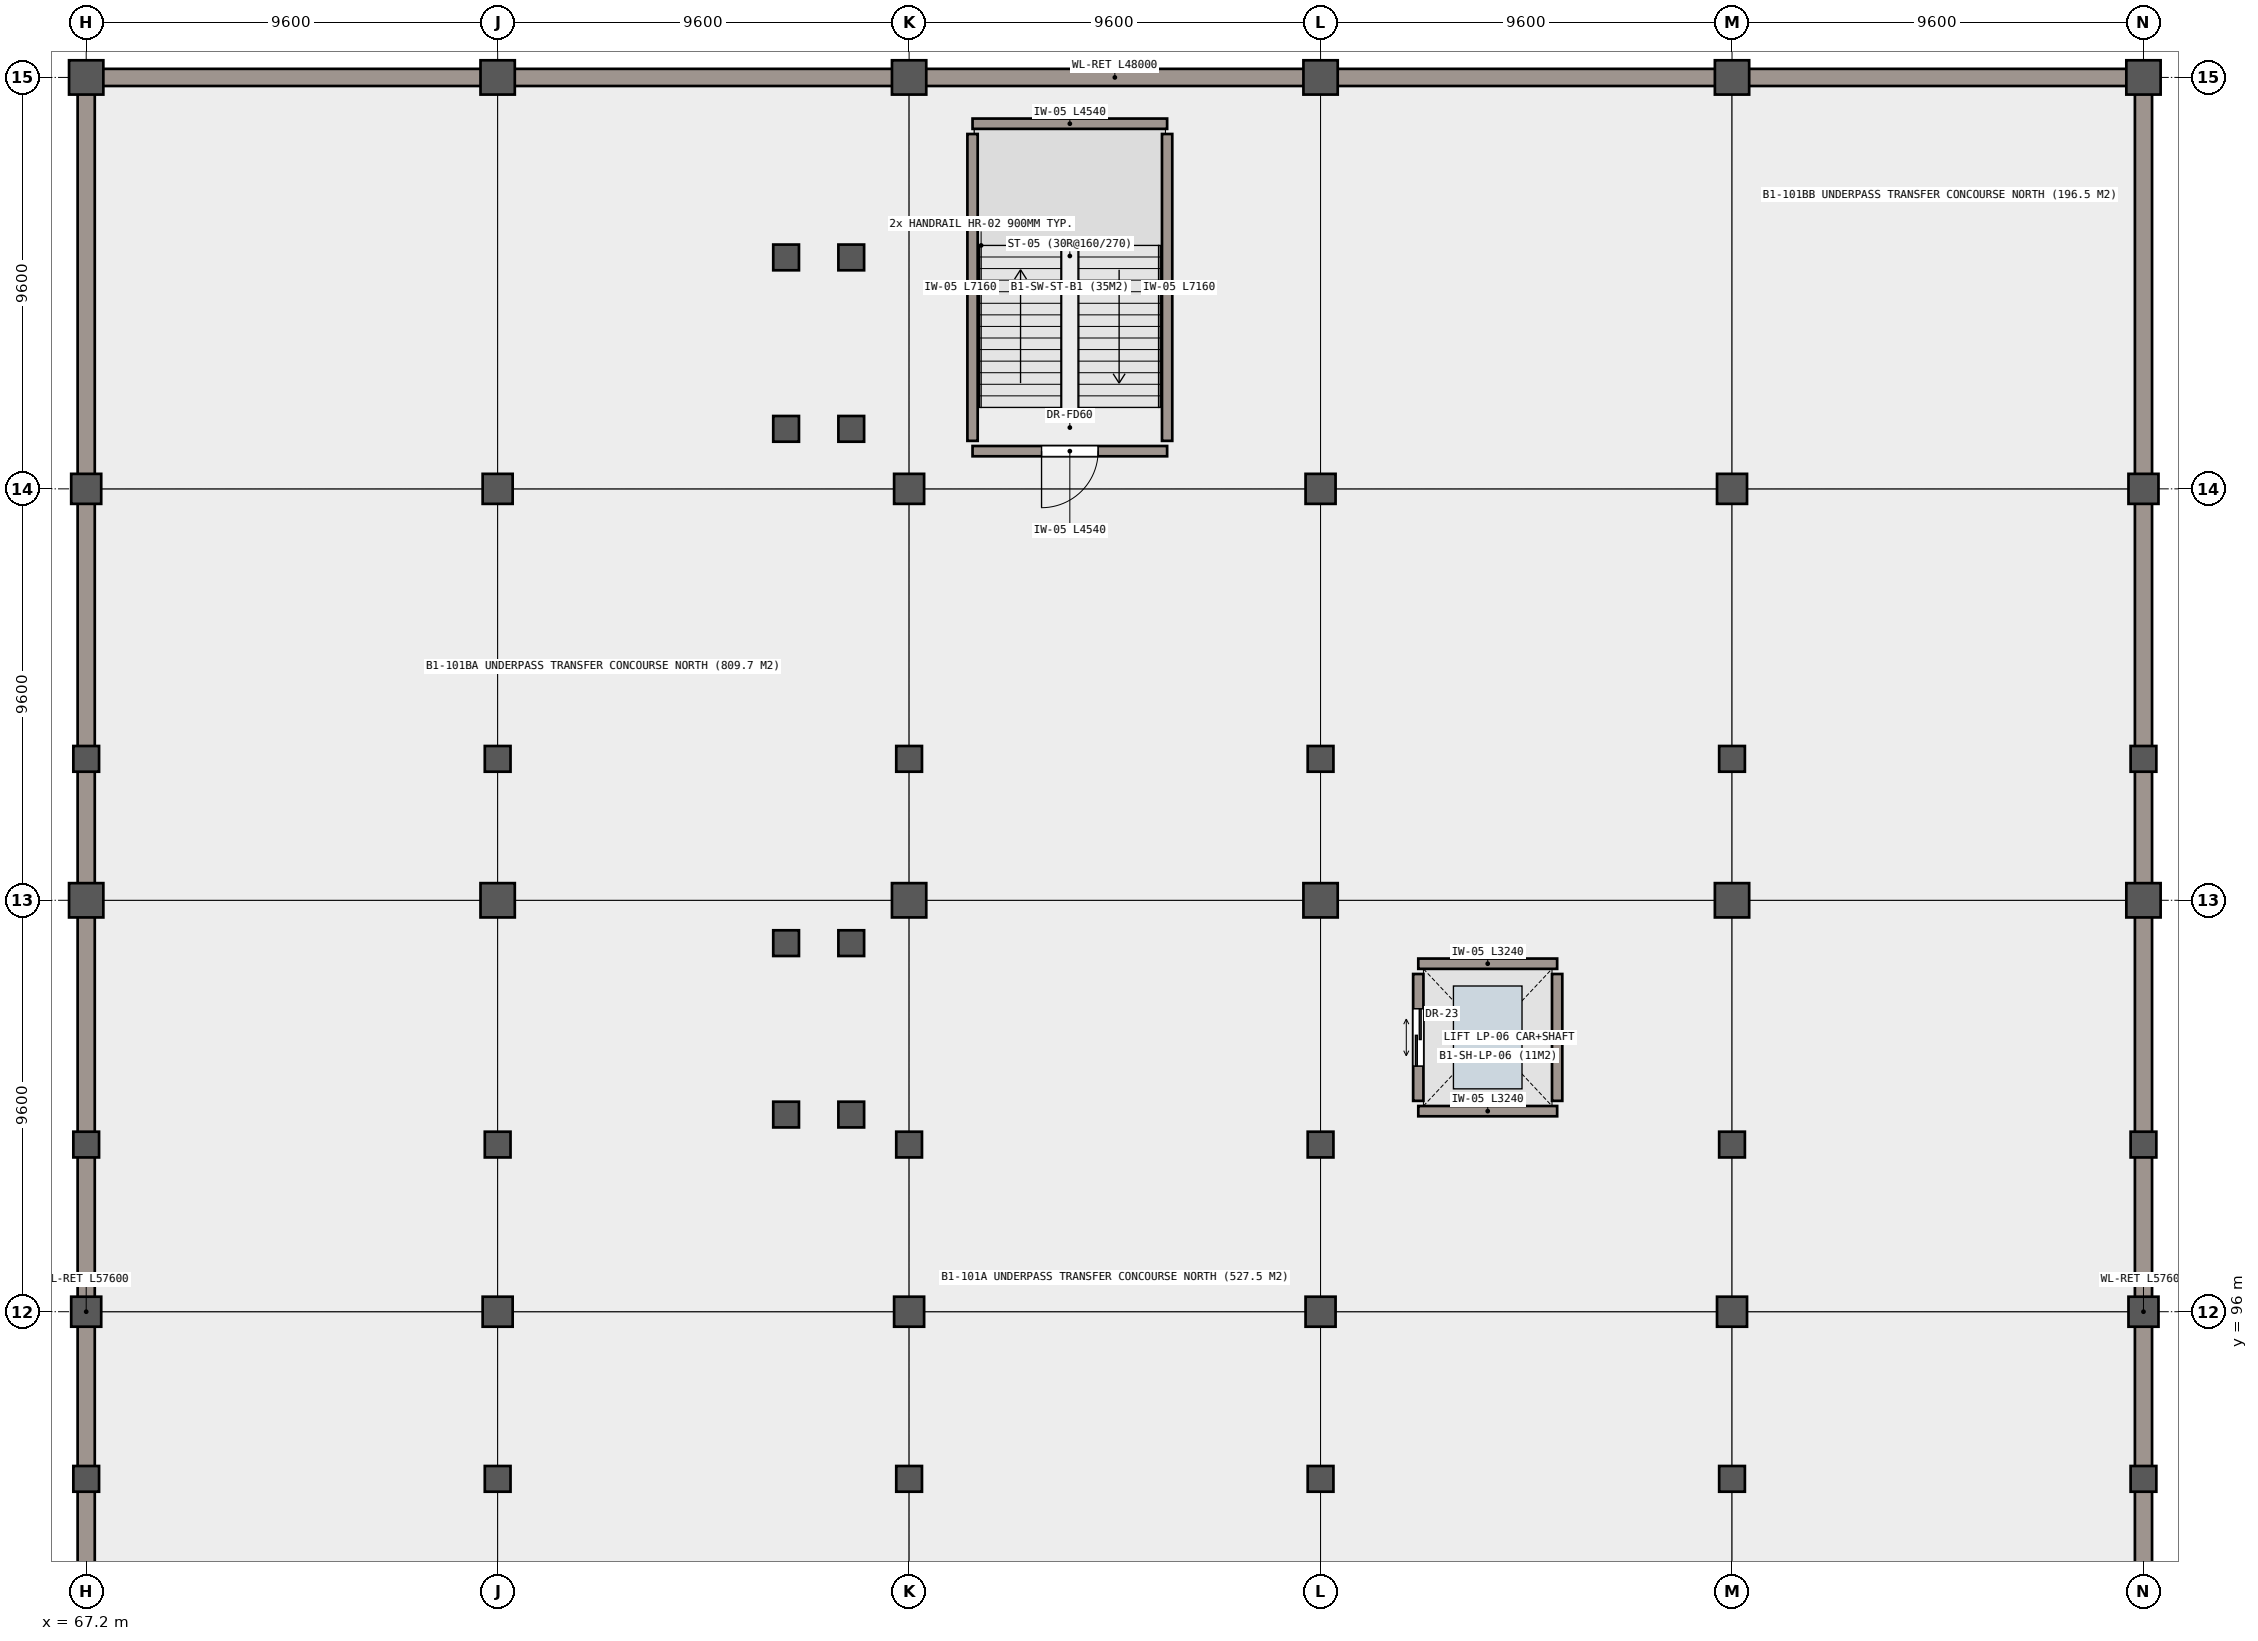
"""IFC4 building model, lengths in metres.
Left out: names, types, materials, properties, quantities, classifications, styles, units other than length and angle.
Written with IfcOpenShell. Run it as: python <this file> out.ifc"""

import sys

from ifc_helpers import new_model, si_unit, direction, frame, frame_2d, origin, origin_2d, place, context, subcontext, project, spatial, rectangle, extrude, element, fill, save


model = new_model("IFC4")
c1 = context("Model", 3, precision=1e-05, world=origin(), true_north=direction((0.0, 1.0)))
c2 = subcontext(c1, "Body", "Model", "MODEL_VIEW")
j1 = project(units=[si_unit("LENGTHUNIT", "METRE"), si_unit("PLANEANGLEUNIT", "RADIAN")], contexts=[c1])
p1 = place(None, origin())
s1 = spatial("IfcSite", under=j1, at=p1, CompositionType="ELEMENT")
p2 = place(p1, origin())
s2 = spatial("IfcBuilding", under=s1, at=p2, CompositionType="ELEMENT")
p3 = place(p2, frame((0.0, 0.0, -4.8)))
s3 = spatial("IfcBuildingStorey", under=s2, at=p3, CompositionType="ELEMENT", Elevation=-4.8)
p4 = place(p3, frame((67.2, 96.0, 0.0), z_axis=(0.0, 0.0, 1.0), x_axis=(1.0, 0.0, 0.0)))
e1 = element("IfcColumn", 1, at=p4, inside=s3, PredefinedType="COLUMN", context=c2, shape_type="SweptSolid", body=[
    extrude(rectangle(XDim=0.7, YDim=0.7, at=origin_2d()), origin(), (0.0, 0.0, 1.0), 4.8),
])
p5 = place(p3, frame((67.2, 105.6, 0.0), z_axis=(0.0, 0.0, 1.0), x_axis=(1.0, 0.0, 0.0)))
e2 = element("IfcColumn", 2, at=p5, inside=s3, PredefinedType="COLUMN", context=c2, shape_type="SweptSolid", body=[
    extrude(rectangle(XDim=0.8, YDim=0.8, at=origin_2d()), origin(), (0.0, 0.0, 1.0), 4.8),
])
p6 = place(p3, frame((67.2, 115.2, 0.0), z_axis=(0.0, 0.0, 1.0), x_axis=(1.0, 0.0, 0.0)))
e3 = element("IfcColumn", 3, at=p6, inside=s3, PredefinedType="COLUMN", context=c2, shape_type="SweptSolid", body=[
    extrude(rectangle(XDim=0.7, YDim=0.7, at=origin_2d()), origin(), (0.0, 0.0, 1.0), 4.8),
])
p7 = place(p3, frame((67.2, 124.8, 0.0), z_axis=(0.0, 0.0, 1.0), x_axis=(1.0, 0.0, 0.0)))
e4 = element("IfcColumn", 4, at=p7, inside=s3, PredefinedType="COLUMN", context=c2, shape_type="SweptSolid", body=[
    extrude(rectangle(XDim=0.8, YDim=0.8, at=origin_2d()), origin(), (0.0, 0.0, 1.0), 4.8),
])
p8 = place(p3, frame((76.8, 96.0, 0.0), z_axis=(0.0, 0.0, 1.0), x_axis=(1.0, 0.0, 0.0)))
e5 = element("IfcColumn", 5, at=p8, inside=s3, PredefinedType="COLUMN", context=c2, shape_type="SweptSolid", body=[
    extrude(rectangle(XDim=0.7, YDim=0.7, at=origin_2d()), origin(), (0.0, 0.0, 1.0), 4.8),
])
p9 = place(p3, frame((76.8, 105.6, 0.0), z_axis=(0.0, 0.0, 1.0), x_axis=(1.0, 0.0, 0.0)))
e6 = element("IfcColumn", 6, at=p9, inside=s3, PredefinedType="COLUMN", context=c2, shape_type="SweptSolid", body=[
    extrude(rectangle(XDim=0.8, YDim=0.8, at=origin_2d()), origin(), (0.0, 0.0, 1.0), 4.8),
])
p10 = place(p3, frame((76.8, 115.2, 0.0), z_axis=(0.0, 0.0, 1.0), x_axis=(1.0, 0.0, 0.0)))
e7 = element("IfcColumn", 7, at=p10, inside=s3, PredefinedType="COLUMN", context=c2, shape_type="SweptSolid", body=[
    extrude(rectangle(XDim=0.7, YDim=0.7, at=origin_2d()), origin(), (0.0, 0.0, 1.0), 4.8),
])
p11 = place(p3, frame((76.8, 124.8, 0.0), z_axis=(0.0, 0.0, 1.0), x_axis=(1.0, 0.0, 0.0)))
e8 = element("IfcColumn", 8, at=p11, inside=s3, PredefinedType="COLUMN", context=c2, shape_type="SweptSolid", body=[
    extrude(rectangle(XDim=0.8, YDim=0.8, at=origin_2d()), origin(), (0.0, 0.0, 1.0), 4.8),
])
p12 = place(p3, frame((86.4, 96.0, 0.0), z_axis=(0.0, 0.0, 1.0), x_axis=(1.0, 0.0, 0.0)))
e9 = element("IfcColumn", 9, at=p12, inside=s3, PredefinedType="COLUMN", context=c2, shape_type="SweptSolid", body=[
    extrude(rectangle(XDim=0.7, YDim=0.7, at=origin_2d()), origin(), (0.0, 0.0, 1.0), 4.8),
])
p13 = place(p3, frame((86.4, 105.6, 0.0), z_axis=(0.0, 0.0, 1.0), x_axis=(1.0, 0.0, 0.0)))
e10 = element("IfcColumn", 10, at=p13, inside=s3, PredefinedType="COLUMN", context=c2, shape_type="SweptSolid", body=[
    extrude(rectangle(XDim=0.8, YDim=0.8, at=origin_2d()), origin(), (0.0, 0.0, 1.0), 4.8),
])
p14 = place(p3, frame((86.4, 115.2, 0.0), z_axis=(0.0, 0.0, 1.0), x_axis=(1.0, 0.0, 0.0)))
e11 = element("IfcColumn", 11, at=p14, inside=s3, PredefinedType="COLUMN", context=c2, shape_type="SweptSolid", body=[
    extrude(rectangle(XDim=0.7, YDim=0.7, at=origin_2d()), origin(), (0.0, 0.0, 1.0), 4.8),
])
p15 = place(p3, frame((86.4, 124.8, 0.0), z_axis=(0.0, 0.0, 1.0), x_axis=(1.0, 0.0, 0.0)))
e12 = element("IfcColumn", 12, at=p15, inside=s3, PredefinedType="COLUMN", context=c2, shape_type="SweptSolid", body=[
    extrude(rectangle(XDim=0.8, YDim=0.8, at=origin_2d()), origin(), (0.0, 0.0, 1.0), 4.8),
])
p16 = place(p3, frame((96.0, 96.0, 0.0), z_axis=(0.0, 0.0, 1.0), x_axis=(1.0, 0.0, 0.0)))
e13 = element("IfcColumn", 13, at=p16, inside=s3, PredefinedType="COLUMN", context=c2, shape_type="SweptSolid", body=[
    extrude(rectangle(XDim=0.7, YDim=0.7, at=origin_2d()), origin(), (0.0, 0.0, 1.0), 4.8),
])
p17 = place(p3, frame((96.0, 105.6, 0.0), z_axis=(0.0, 0.0, 1.0), x_axis=(1.0, 0.0, 0.0)))
e14 = element("IfcColumn", 14, at=p17, inside=s3, PredefinedType="COLUMN", context=c2, shape_type="SweptSolid", body=[
    extrude(rectangle(XDim=0.8, YDim=0.8, at=origin_2d()), origin(), (0.0, 0.0, 1.0), 4.8),
])
p18 = place(p3, frame((96.0, 115.2, 0.0), z_axis=(0.0, 0.0, 1.0), x_axis=(1.0, 0.0, 0.0)))
e15 = element("IfcColumn", 15, at=p18, inside=s3, PredefinedType="COLUMN", context=c2, shape_type="SweptSolid", body=[
    extrude(rectangle(XDim=0.7, YDim=0.7, at=origin_2d()), origin(), (0.0, 0.0, 1.0), 4.8),
])
p19 = place(p3, frame((96.0, 124.8, 0.0), z_axis=(0.0, 0.0, 1.0), x_axis=(1.0, 0.0, 0.0)))
e16 = element("IfcColumn", 16, at=p19, inside=s3, PredefinedType="COLUMN", context=c2, shape_type="SweptSolid", body=[
    extrude(rectangle(XDim=0.8, YDim=0.8, at=origin_2d()), origin(), (0.0, 0.0, 1.0), 4.8),
])
p20 = place(p3, frame((105.6, 96.0, 0.0), z_axis=(0.0, 0.0, 1.0), x_axis=(1.0, 0.0, 0.0)))
e17 = element("IfcColumn", 17, at=p20, inside=s3, PredefinedType="COLUMN", context=c2, shape_type="SweptSolid", body=[
    extrude(rectangle(XDim=0.7, YDim=0.7, at=origin_2d()), origin(), (0.0, 0.0, 1.0), 4.8),
])
p21 = place(p3, frame((105.6, 105.6, 0.0), z_axis=(0.0, 0.0, 1.0), x_axis=(1.0, 0.0, 0.0)))
e18 = element("IfcColumn", 18, at=p21, inside=s3, PredefinedType="COLUMN", context=c2, shape_type="SweptSolid", body=[
    extrude(rectangle(XDim=0.8, YDim=0.8, at=origin_2d()), origin(), (0.0, 0.0, 1.0), 4.8),
])
p22 = place(p3, frame((105.6, 115.2, 0.0), z_axis=(0.0, 0.0, 1.0), x_axis=(1.0, 0.0, 0.0)))
e19 = element("IfcColumn", 19, at=p22, inside=s3, PredefinedType="COLUMN", context=c2, shape_type="SweptSolid", body=[
    extrude(rectangle(XDim=0.7, YDim=0.7, at=origin_2d()), origin(), (0.0, 0.0, 1.0), 4.8),
])
p23 = place(p3, frame((105.6, 124.8, 0.0), z_axis=(0.0, 0.0, 1.0), x_axis=(1.0, 0.0, 0.0)))
e20 = element("IfcColumn", 20, at=p23, inside=s3, PredefinedType="COLUMN", context=c2, shape_type="SweptSolid", body=[
    extrude(rectangle(XDim=0.8, YDim=0.8, at=origin_2d()), origin(), (0.0, 0.0, 1.0), 4.8),
])
p24 = place(p3, frame((115.2, 96.0, 0.0), z_axis=(0.0, 0.0, 1.0), x_axis=(1.0, 0.0, 0.0)))
e21 = element("IfcColumn", 21, at=p24, inside=s3, PredefinedType="COLUMN", context=c2, shape_type="SweptSolid", body=[
    extrude(rectangle(XDim=0.7, YDim=0.7, at=origin_2d()), origin(), (0.0, 0.0, 1.0), 4.8),
])
p25 = place(p3, frame((115.2, 105.6, 0.0), z_axis=(0.0, 0.0, 1.0), x_axis=(1.0, 0.0, 0.0)))
e22 = element("IfcColumn", 22, at=p25, inside=s3, PredefinedType="COLUMN", context=c2, shape_type="SweptSolid", body=[
    extrude(rectangle(XDim=0.8, YDim=0.8, at=origin_2d()), origin(), (0.0, 0.0, 1.0), 4.8),
])
p26 = place(p3, frame((115.2, 115.2, 0.0), z_axis=(0.0, 0.0, 1.0), x_axis=(1.0, 0.0, 0.0)))
e23 = element("IfcColumn", 23, at=p26, inside=s3, PredefinedType="COLUMN", context=c2, shape_type="SweptSolid", body=[
    extrude(rectangle(XDim=0.7, YDim=0.7, at=origin_2d()), origin(), (0.0, 0.0, 1.0), 4.8),
])
p27 = place(p3, frame((115.2, 124.8, 0.0), z_axis=(0.0, 0.0, 1.0), x_axis=(1.0, 0.0, 0.0)))
e24 = element("IfcColumn", 24, at=p27, inside=s3, PredefinedType="COLUMN", context=c2, shape_type="SweptSolid", body=[
    extrude(rectangle(XDim=0.8, YDim=0.8, at=origin_2d()), origin(), (0.0, 0.0, 1.0), 4.8),
])
for number, where, z_axis, x_axis in (
    (25, (67.2, 92.1, 0.0), (0.0, 0.0, 1.0), (1.0, 0.0, 0.0)),
    (26, (76.8, 92.1, 0.0), (0.0, 0.0, 1.0), (1.0, 0.0, 0.0)),
    (27, (86.4, 92.1, 0.0), (0.0, 0.0, 1.0), (1.0, 0.0, 0.0)),
    (28, (96.0, 92.1, 0.0), (0.0, 0.0, 1.0), (1.0, 0.0, 0.0)),
    (29, (105.6, 92.1, 0.0), (0.0, 0.0, 1.0), (1.0, 0.0, 0.0)),
    (30, (115.2, 92.1, 0.0), (0.0, 0.0, 1.0), (1.0, 0.0, 0.0)),
    (31, (67.2, 99.9, 0.0), (0.0, 0.0, 1.0), (1.0, 0.0, 0.0)),
    (32, (67.2, 108.9, 0.0), (0.0, 0.0, 1.0), (1.0, 0.0, 0.0)),
    (33, (76.8, 99.9, 0.0), (0.0, 0.0, 1.0), (1.0, 0.0, 0.0)),
    (34, (76.8, 108.9, 0.0), (0.0, 0.0, 1.0), (1.0, 0.0, 0.0)),
    (35, (86.4, 99.9, 0.0), (0.0, 0.0, 1.0), (1.0, 0.0, 0.0)),
    (36, (86.4, 108.9, 0.0), (0.0, 0.0, 1.0), (1.0, 0.0, 0.0)),
    (37, (96.0, 99.9, 0.0), (0.0, 0.0, 1.0), (1.0, 0.0, 0.0)),
    (38, (96.0, 108.9, 0.0), (0.0, 0.0, 1.0), (1.0, 0.0, 0.0)),
    (39, (105.6, 99.9, 0.0), (0.0, 0.0, 1.0), (1.0, 0.0, 0.0)),
    (40, (105.6, 108.9, 0.0), (0.0, 0.0, 1.0), (1.0, 0.0, 0.0)),
    (41, (115.2, 99.9, 0.0), (0.0, 0.0, 1.0), (1.0, 0.0, 0.0)),
    (42, (115.2, 108.9, 0.0), (0.0, 0.0, 1.0), (1.0, 0.0, 0.0)),
):
    element("IfcColumn", number, at=place(p3, frame(where, z_axis=z_axis, x_axis=x_axis)), inside=s3, PredefinedType="COLUMN", context=c2, shape_type="SweptSolid", body=[
        extrude(rectangle(XDim=0.6, YDim=0.6, at=origin_2d()), origin(), (0.0, 0.0, 1.0), 4.5),
    ])
for number, where, z_axis, x_axis in (
    (43, (83.53, 100.6, 0.0), (0.0, 0.0, 1.0), (1.0, 0.0, 0.0)),
    (44, (83.53, 104.6, 0.0), (0.0, 0.0, 1.0), (1.0, 0.0, 0.0)),
    (45, (85.05, 100.6, 0.0), (0.0, 0.0, 1.0), (1.0, 0.0, 0.0)),
    (46, (85.05, 104.6, 0.0), (0.0, 0.0, 1.0), (1.0, 0.0, 0.0)),
    (47, (83.53, 116.6, 0.0), (0.0, 0.0, 1.0), (1.0, 0.0, 0.0)),
    (48, (83.53, 120.6, 0.0), (0.0, 0.0, 1.0), (1.0, 0.0, 0.0)),
    (49, (85.05, 116.6, 0.0), (0.0, 0.0, 1.0), (1.0, 0.0, 0.0)),
    (50, (85.05, 120.6, 0.0), (0.0, 0.0, 1.0), (1.0, 0.0, 0.0)),
):
    element("IfcColumn", number, at=place(p3, frame(where, z_axis=z_axis, x_axis=x_axis)), inside=s3, PredefinedType="COLUMN", context=c2, shape_type="SweptSolid", body=[
        extrude(rectangle(XDim=0.6, YDim=0.6, at=origin_2d()), origin(), (0.0, 0.0, 1.0), 4.8),
    ])
p28 = place(p3, frame((67.2, 67.2, 0.0), z_axis=(0.0, 0.0, 1.0), x_axis=(0.0, 1.0, 0.0)))
e51 = element("IfcWall", 51, at=p28, inside=s3, PredefinedType="USERDEFINED", context=c2, shape_type="SweptSolid", body=[
    extrude(rectangle(XDim=57.6, YDim=0.4, at=frame_2d((28.8, 0.0))), origin(), (0.0, 0.0, 1.0), 3.88),
])
p29 = place(p3, frame((67.2, 124.8, 0.0), z_axis=(0.0, 0.0, 1.0), x_axis=(1.0, 0.0, 0.0)))
e52 = element("IfcWall", 52, at=p29, inside=s3, PredefinedType="USERDEFINED", context=c2, shape_type="SweptSolid", body=[
    extrude(rectangle(XDim=48.0, YDim=0.4, at=frame_2d((24.0, 0.0))), origin(), (0.0, 0.0, 1.0), 3.88),
])
p30 = place(p3, frame((115.2, 124.8, 0.0), z_axis=(0.0, 0.0, 1.0), x_axis=(0.0, -1.0, 0.0)))
e53 = element("IfcWall", 53, at=p30, inside=s3, PredefinedType="USERDEFINED", context=c2, shape_type="SweptSolid", body=[
    extrude(rectangle(XDim=57.6, YDim=0.4, at=frame_2d((28.8, 0.0))), origin(), (0.0, 0.0, 1.0), 3.88),
])
for number, where, z_axis, x_axis in (
    (54, (101.52, 100.68, 0.0), (0.0, 0.0, 1.0), (-1.0, 0.0, 0.0)),
    (55, (98.28, 104.12, 0.0), (0.0, 0.0, 1.0), (1.0, 0.0, 0.0)),
):
    element("IfcWall", number, at=place(p3, frame(where, z_axis=z_axis, x_axis=x_axis)), inside=s3, PredefinedType="SHEAR", context=c2, shape_type="SweptSolid", body=[
        extrude(rectangle(XDim=3.24, YDim=0.24, at=frame_2d((1.62, 0.0))), origin(), (0.0, 0.0, 1.0), 4.48),
    ])
p31 = place(p3, frame((98.28, 100.92, 0.0), z_axis=(0.0, 0.0, 1.0), x_axis=(0.0, 1.0, 0.0)))
e56 = element("IfcWall", 56, at=p31, inside=s3, PredefinedType="SHEAR", context=c2, shape_type="SweptSolid", body=[
    extrude(rectangle(XDim=2.96, YDim=0.24, at=frame_2d((1.48, 0.0))), origin(), (0.0, 0.0, 1.0), 4.48),
])
p32 = place(p31, frame((0.81, 0.0, 0.0)))
e57 = element("IfcOpeningElement", 57, at=p32, cuts=e56, PredefinedType="OPENING", context=c2, shape_type="SweptSolid", body=[
    extrude(rectangle(XDim=1.34, YDim=2.18, at=frame_2d((0.67, 1.09))), frame((0.0, 0.13, 0.0), z_axis=(0.0, -1.0, 0.0), x_axis=(1.0, 0.0, 0.0)), (0.0, 0.0, 1.0), 0.26),
])
p33 = place(p3, frame((101.52, 103.88, 0.0), z_axis=(0.0, 0.0, 1.0), x_axis=(0.0, -1.0, 0.0)))
e58 = element("IfcWall", 58, at=p33, inside=s3, PredefinedType="SHEAR", context=c2, shape_type="SweptSolid", body=[
    extrude(rectangle(XDim=2.96, YDim=0.24, at=frame_2d((1.48, 0.0))), origin(), (0.0, 0.0, 1.0), 4.48),
])
p34 = place(p3, frame((92.42, 116.08, 0.0), z_axis=(0.0, 0.0, 1.0), x_axis=(-1.0, 0.0, 0.0)))
e59 = element("IfcWall", 59, at=p34, inside=s3, PredefinedType="SHEAR", context=c2, shape_type="SweptSolid", body=[
    extrude(rectangle(XDim=4.54, YDim=0.24, at=frame_2d((2.27, 0.0))), origin(), (0.0, 0.0, 1.0), 4.48),
])
p35 = place(p34, frame((1.61, 0.0, 0.0)))
e60 = element("IfcOpeningElement", 60, at=p35, cuts=e59, PredefinedType="OPENING", context=c2, shape_type="SweptSolid", body=[
    extrude(rectangle(XDim=1.32, YDim=2.15, at=frame_2d((0.66, 1.075))), frame((0.0, 0.13, 0.0), z_axis=(0.0, -1.0, 0.0), x_axis=(1.0, 0.0, 0.0)), (0.0, 0.0, 1.0), 0.26),
])
p36 = place(p3, frame((87.88, 123.72, 0.0), z_axis=(0.0, 0.0, 1.0), x_axis=(1.0, 0.0, 0.0)))
e61 = element("IfcWall", 61, at=p36, inside=s3, PredefinedType="SHEAR", context=c2, shape_type="SweptSolid", body=[
    extrude(rectangle(XDim=4.54, YDim=0.24, at=frame_2d((2.27, 0.0))), origin(), (0.0, 0.0, 1.0), 4.48),
])
for number, where, z_axis, x_axis in (
    (62, (87.88, 116.32, 0.0), (0.0, 0.0, 1.0), (0.0, 1.0, 0.0)),
    (63, (92.42, 123.48, 0.0), (0.0, 0.0, 1.0), (0.0, -1.0, 0.0)),
):
    element("IfcWall", number, at=place(p3, frame(where, z_axis=z_axis, x_axis=x_axis)), inside=s3, PredefinedType="SHEAR", context=c2, shape_type="SweptSolid", body=[
        extrude(rectangle(XDim=7.16, YDim=0.24, at=frame_2d((3.58, 0.0))), origin(), (0.0, 0.0, 1.0), 4.48),
    ])
p37 = place(p32, origin())
e64 = element("IfcDoor", 64, at=p37, inside=s3, OperationType="DOUBLE_DOOR_SLIDING", PredefinedType="DOOR", context=c2, shape_type="SweptSolid", body=[
    extrude(rectangle(XDim=1.34, YDim=2.18, at=frame_2d((0.67, 1.09))), frame((0.0, 0.025, 0.0), z_axis=(0.0, -1.0, 0.0), x_axis=(1.0, 0.0, 0.0)), (0.0, 0.0, 1.0), 0.05),
])
fill(e57, e64)
p38 = place(p35, origin())
e65 = element("IfcDoor", 65, at=p38, inside=s3, OperationType="SINGLE_SWING_RIGHT", PredefinedType="DOOR", context=c2, shape_type="SweptSolid", body=[
    extrude(rectangle(XDim=1.32, YDim=2.15, at=frame_2d((0.66, 1.075))), frame((0.0, 0.025, 0.0), z_axis=(0.0, -1.0, 0.0), x_axis=(1.0, 0.0, 0.0)), (0.0, 0.0, 1.0), 0.05),
])
fill(e60, e65)
save(model, sys.argv[1])
